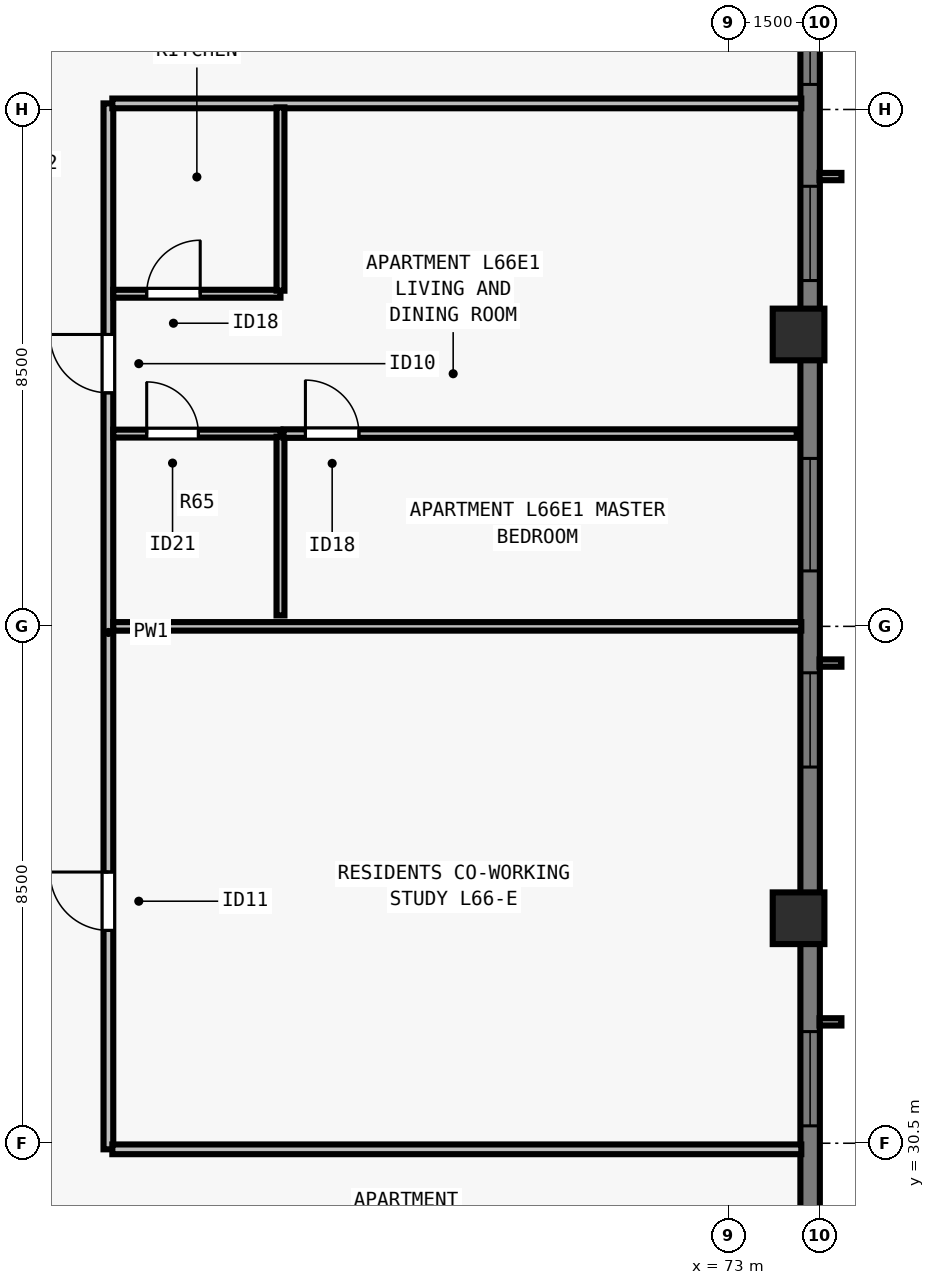
"""IFC4 building model, lengths in metres.
Left out: names, types, materials, properties, quantities, classifications, styles, units other than length and angle.
Written with IfcOpenShell. Run it as: python <this file> out.ifc"""

import sys

from ifc_helpers import new_model, si_unit, direction, frame, frame_2d, origin, origin_2d, place, context, subcontext, project, spatial, rectangle, extrude, element, fill, save


model = new_model("IFC4")
c1 = context("Model", 3, precision=1e-05, world=origin(), true_north=direction((0.0, 1.0)))
c2 = subcontext(c1, "Body", "Model", "MODEL_VIEW")
j1 = project(units=[si_unit("LENGTHUNIT", "METRE"), si_unit("PLANEANGLEUNIT", "RADIAN")], contexts=[c1])
p1 = place(None, origin())
s1 = spatial("IfcSite", under=j1, at=p1, CompositionType="ELEMENT")
p2 = place(p1, origin())
s2 = spatial("IfcBuilding", under=s1, at=p2, CompositionType="ELEMENT")
p3 = place(p2, frame((0.0, 0.0, 241.0)))
s3 = spatial("IfcBuildingStorey", under=s2, at=p3, CompositionType="ELEMENT", Elevation=241.0)
for number, where, z_axis, x_axis in (
    (1, (74.15, 34.2, 0.0), (0.0, 0.0, 1.0), (0.0, 1.0, 0.0)),
    (2, (74.15, 43.8, 0.0), (0.0, 0.0, 1.0), (0.0, 1.0, 0.0)),
):
    element("IfcColumn", number, at=place(p3, frame(where, z_axis=z_axis, x_axis=x_axis)), inside=s3, PredefinedType="COLUMN", context=c2, shape_type="SweptSolid", body=[
        extrude(rectangle(XDim=0.85, YDim=0.85, at=origin_2d()), origin(), (0.0, 0.0, 1.0), 3.5),
    ])
p4 = place(p3, frame((74.34, 56.5, 0.0), z_axis=(0.0, 0.0, 1.0), x_axis=(0.0, -1.0, 0.0)))
e3 = element("IfcWall", 3, at=p4, inside=s3, PredefinedType="SOLIDWALL", context=c2, shape_type="SweptSolid", body=[
    extrude(rectangle(XDim=34.702, YDim=0.32, at=frame_2d((17.351, 0.0))), origin(), (0.0, 0.0, 1.0), 3.29),
])
p5 = place(p4, frame((3.913, 0.0, 0.8)))
e4 = element("IfcOpeningElement", 4, at=p5, cuts=e3, PredefinedType="OPENING", context=c2, shape_type="SweptSolid", body=[
    extrude(rectangle(XDim=1.55, YDim=1.678, at=frame_2d((0.775, 0.839))), frame((0.0, 0.17, 0.0), z_axis=(0.0, -1.0, 0.0), x_axis=(1.0, 0.0, 0.0)), (0.0, 0.0, 1.0), 0.34),
])
p6 = place(p4, frame((6.738, 0.0, 0.8)))
e5 = element("IfcOpeningElement", 5, at=p6, cuts=e3, PredefinedType="OPENING", context=c2, shape_type="SweptSolid", body=[
    extrude(rectangle(XDim=1.85, YDim=1.678, at=frame_2d((0.925, 0.839))), frame((0.0, 0.17, 0.0), z_axis=(0.0, -1.0, 0.0), x_axis=(1.0, 0.0, 0.0)), (0.0, 0.0, 1.0), 0.34),
])
p7 = place(p4, frame((10.263, 0.0, 0.8)))
e6 = element("IfcOpeningElement", 6, at=p7, cuts=e3, PredefinedType="OPENING", context=c2, shape_type="SweptSolid", body=[
    extrude(rectangle(XDim=1.55, YDim=1.678, at=frame_2d((0.775, 0.839))), frame((0.0, 0.17, 0.0), z_axis=(0.0, -1.0, 0.0), x_axis=(1.0, 0.0, 0.0)), (0.0, 0.0, 1.0), 0.34),
])
p8 = place(p4, frame((14.738, 0.0, 0.8)))
e7 = element("IfcOpeningElement", 7, at=p8, cuts=e3, PredefinedType="OPENING", context=c2, shape_type="SweptSolid", body=[
    extrude(rectangle(XDim=1.85, YDim=1.678, at=frame_2d((0.925, 0.839))), frame((0.0, 0.17, 0.0), z_axis=(0.0, -1.0, 0.0), x_axis=(1.0, 0.0, 0.0)), (0.0, 0.0, 1.0), 0.34),
])
p9 = place(p4, frame((18.264, 0.0, 0.8)))
e8 = element("IfcOpeningElement", 8, at=p9, cuts=e3, PredefinedType="OPENING", context=c2, shape_type="SweptSolid", body=[
    extrude(rectangle(XDim=1.55, YDim=1.678, at=frame_2d((0.775, 0.839))), frame((0.0, 0.17, 0.0), z_axis=(0.0, -1.0, 0.0), x_axis=(1.0, 0.0, 0.0)), (0.0, 0.0, 1.0), 0.34),
])
p10 = place(p4, frame((24.164, 0.0, 0.8)))
e9 = element("IfcOpeningElement", 9, at=p10, cuts=e3, PredefinedType="OPENING", context=c2, shape_type="SweptSolid", body=[
    extrude(rectangle(XDim=1.55, YDim=1.678, at=frame_2d((0.775, 0.839))), frame((0.0, 0.17, 0.0), z_axis=(0.0, -1.0, 0.0), x_axis=(1.0, 0.0, 0.0)), (0.0, 0.0, 1.0), 0.34),
])
p11 = place(p3, frame((62.8, 30.4, 0.0), z_axis=(0.0, 0.0, 1.0), x_axis=(0.0, 1.0, 0.0)))
e10 = element("IfcWall", 10, at=p11, inside=s3, PredefinedType="PARTITIONING", context=c2, shape_type="SweptSolid", body=[
    extrude(rectangle(XDim=17.2, YDim=0.16, at=frame_2d((8.6, 0.0))), origin(), (0.0, 0.0, 1.0), 3.29),
])
p12 = place(p11, frame((3.6, 0.0, 0.0)))
e11 = element("IfcOpeningElement", 11, at=p12, cuts=e10, PredefinedType="OPENING", context=c2, shape_type="SweptSolid", body=[
    extrude(rectangle(XDim=0.96, YDim=2.12, at=frame_2d((0.48, 1.06))), frame((0.0, 0.09, 0.0), z_axis=(0.0, -1.0, 0.0), x_axis=(1.0, 0.0, 0.0)), (0.0, 0.0, 1.0), 0.18),
])
p13 = place(p11, frame((12.44, 0.0, 0.0)))
e12 = element("IfcOpeningElement", 12, at=p13, cuts=e10, PredefinedType="OPENING", context=c2, shape_type="SweptSolid", body=[
    extrude(rectangle(XDim=0.96, YDim=2.18, at=frame_2d((0.48, 1.09))), frame((0.0, 0.09, 0.0), z_axis=(0.0, -1.0, 0.0), x_axis=(1.0, 0.0, 0.0)), (0.0, 0.0, 1.0), 0.18),
])
for number, where, z_axis, x_axis in (
    (13, (62.865, 30.4, 0.0), (0.0, 0.0, 1.0), (1.0, 0.0, 0.0)),
    (14, (62.865, 47.6, 0.0), (0.0, 0.0, 1.0), (1.0, 0.0, 0.0)),
):
    element("IfcWall", number, at=place(p3, frame(where, z_axis=z_axis, x_axis=x_axis)), inside=s3, PredefinedType="PARTITIONING", context=c2, shape_type="SweptSolid", body=[
        extrude(rectangle(XDim=11.33, YDim=0.16, at=frame_2d((5.665, 0.0))), origin(), (0.0, 0.0, 1.0), 3.29),
    ])
p14 = place(p3, frame((62.88, 39.0, 0.0), z_axis=(0.0, 0.0, 1.0), x_axis=(1.0, 0.0, 0.0)))
e15 = element("IfcWall", 15, at=p14, inside=s3, PredefinedType="PARTITIONING", context=c2, shape_type="SweptSolid", body=[
    extrude(rectangle(XDim=11.315, YDim=0.14, at=frame_2d((5.658, 0.0))), origin(), (0.0, 0.0, 1.0), 3.29),
])
p15 = place(p3, frame((62.88, 42.17, 0.0), z_axis=(0.0, 0.0, 1.0), x_axis=(1.0, 0.0, 0.0)))
e16 = element("IfcWall", 16, at=p15, inside=s3, PredefinedType="PLUMBINGWALL", context=c2, shape_type="SweptSolid", body=[
    extrude(rectangle(XDim=2.75, YDim=0.13, at=frame_2d((1.375, 0.0))), origin(), (0.0, 0.0, 1.0), 3.29),
])
p16 = place(p15, frame((0.55, 0.0, 0.0)))
e17 = element("IfcOpeningElement", 17, at=p16, cuts=e16, PredefinedType="OPENING", context=c2, shape_type="SweptSolid", body=[
    extrude(rectangle(XDim=0.85, YDim=2.08, at=frame_2d((0.425, 1.04))), frame((0.0, 0.075, 0.0), z_axis=(0.0, -1.0, 0.0), x_axis=(1.0, 0.0, 0.0)), (0.0, 0.0, 1.0), 0.15),
])
p17 = place(p3, frame((65.63, 39.18, 0.0), z_axis=(0.0, 0.0, 1.0), x_axis=(0.0, 1.0, 0.0)))
e18 = element("IfcWall", 18, at=p17, inside=s3, PredefinedType="PLUMBINGWALL", context=c2, shape_type="SweptSolid", body=[
    extrude(rectangle(XDim=2.94, YDim=0.13, at=frame_2d((1.47, 0.0))), origin(), (0.0, 0.0, 1.0), 3.29),
])
p18 = place(p3, frame((62.88, 44.47, 0.0), z_axis=(0.0, 0.0, 1.0), x_axis=(1.0, 0.0, 0.0)))
e19 = element("IfcWall", 19, at=p18, inside=s3, PredefinedType="PLUMBINGWALL", context=c2, shape_type="SweptSolid", body=[
    extrude(rectangle(XDim=2.75, YDim=0.13, at=frame_2d((1.375, 0.0))), origin(), (0.0, 0.0, 1.0), 3.29),
])
p19 = place(p18, frame((0.55, 0.0, 0.0)))
e20 = element("IfcOpeningElement", 20, at=p19, cuts=e19, PredefinedType="OPENING", context=c2, shape_type="SweptSolid", body=[
    extrude(rectangle(XDim=0.88, YDim=2.1, at=frame_2d((0.44, 1.05))), frame((0.0, 0.075, 0.0), z_axis=(0.0, -1.0, 0.0), x_axis=(1.0, 0.0, 0.0)), (0.0, 0.0, 1.0), 0.15),
])
p20 = place(p3, frame((65.63, 44.52, 0.0), z_axis=(0.0, 0.0, 1.0), x_axis=(0.0, 1.0, 0.0)))
e21 = element("IfcWall", 21, at=p20, inside=s3, PredefinedType="PLUMBINGWALL", context=c2, shape_type="SweptSolid", body=[
    extrude(rectangle(XDim=3.015, YDim=0.13, at=frame_2d((1.507, 0.0))), origin(), (0.0, 0.0, 1.0), 3.29),
])
p21 = place(p3, frame((65.68, 42.17, 0.0), z_axis=(0.0, 0.0, 1.0), x_axis=(1.0, 0.0, 0.0)))
e22 = element("IfcWall", 22, at=p21, inside=s3, PredefinedType="PARTITIONING", context=c2, shape_type="SweptSolid", body=[
    extrude(rectangle(XDim=8.44, YDim=0.14, at=frame_2d((4.22, 0.0))), origin(), (0.0, 0.0, 1.0), 3.29),
])
p22 = place(p21, frame((0.36, 0.0, 0.0)))
e23 = element("IfcOpeningElement", 23, at=p22, cuts=e22, PredefinedType="OPENING", context=c2, shape_type="SweptSolid", body=[
    extrude(rectangle(XDim=0.88, YDim=2.1, at=frame_2d((0.44, 1.05))), frame((0.0, 0.08, 0.0), z_axis=(0.0, -1.0, 0.0), x_axis=(1.0, 0.0, 0.0)), (0.0, 0.0, 1.0), 0.16),
])
p23 = place(p6, origin())
e24 = element("IfcWindow", 24, at=p23, inside=s3, PartitioningType="SINGLE_PANEL", PredefinedType="WINDOW", context=c2, shape_type="SweptSolid", body=[
    extrude(rectangle(XDim=1.85, YDim=1.678, at=frame_2d((0.925, 0.839))), frame((0.0, -0.05, 0.0), z_axis=(0.0, -1.0, 0.0), x_axis=(1.0, 0.0, 0.0)), (0.0, 0.0, 1.0), 0.06),
])
fill(e5, e24)
p24 = place(p7, origin())
e25 = element("IfcWindow", 25, at=p24, inside=s3, PartitioningType="SINGLE_PANEL", PredefinedType="WINDOW", context=c2, shape_type="SweptSolid", body=[
    extrude(rectangle(XDim=1.55, YDim=1.678, at=frame_2d((0.775, 0.839))), frame((0.0, -0.05, 0.0), z_axis=(0.0, -1.0, 0.0), x_axis=(1.0, 0.0, 0.0)), (0.0, 0.0, 1.0), 0.06),
])
fill(e6, e25)
p25 = place(p8, origin())
e26 = element("IfcWindow", 26, at=p25, inside=s3, PartitioningType="SINGLE_PANEL", PredefinedType="WINDOW", context=c2, shape_type="SweptSolid", body=[
    extrude(rectangle(XDim=1.85, YDim=1.678, at=frame_2d((0.925, 0.839))), frame((0.0, -0.05, 0.0), z_axis=(0.0, -1.0, 0.0), x_axis=(1.0, 0.0, 0.0)), (0.0, 0.0, 1.0), 0.06),
])
fill(e7, e26)
p26 = place(p9, origin())
e27 = element("IfcWindow", 27, at=p26, inside=s3, PartitioningType="SINGLE_PANEL", PredefinedType="WINDOW", context=c2, shape_type="SweptSolid", body=[
    extrude(rectangle(XDim=1.55, YDim=1.678, at=frame_2d((0.775, 0.839))), frame((0.0, -0.05, 0.0), z_axis=(0.0, -1.0, 0.0), x_axis=(1.0, 0.0, 0.0)), (0.0, 0.0, 1.0), 0.06),
])
fill(e8, e27)
p27 = place(p10, origin())
e28 = element("IfcWindow", 28, at=p27, inside=s3, PartitioningType="SINGLE_PANEL", PredefinedType="WINDOW", context=c2, shape_type="SweptSolid", body=[
    extrude(rectangle(XDim=1.55, YDim=1.678, at=frame_2d((0.775, 0.839))), frame((0.0, -0.05, 0.0), z_axis=(0.0, -1.0, 0.0), x_axis=(1.0, 0.0, 0.0)), (0.0, 0.0, 1.0), 0.06),
])
fill(e9, e28)
p28 = place(p12, origin())
e29 = element("IfcDoor", 29, at=p28, inside=s3, OperationType="SINGLE_SWING_RIGHT", PredefinedType="DOOR", context=c2, shape_type="SweptSolid", body=[
    extrude(rectangle(XDim=0.96, YDim=2.12, at=frame_2d((0.48, 1.06))), frame((0.0, 0.025, 0.0), z_axis=(0.0, -1.0, 0.0), x_axis=(1.0, 0.0, 0.0)), (0.0, 0.0, 1.0), 0.05),
])
fill(e11, e29)
p29 = place(p16, origin())
e30 = element("IfcDoor", 30, at=p29, inside=s3, OperationType="SINGLE_SWING_LEFT", PredefinedType="DOOR", context=c2, shape_type="SweptSolid", body=[
    extrude(rectangle(XDim=0.85, YDim=2.08, at=frame_2d((0.425, 1.04))), frame((0.0, 0.025, 0.0), z_axis=(0.0, -1.0, 0.0), x_axis=(1.0, 0.0, 0.0)), (0.0, 0.0, 1.0), 0.05),
])
fill(e17, e30)
p30 = place(p19, origin())
e31 = element("IfcDoor", 31, at=p30, inside=s3, OperationType="SINGLE_SWING_RIGHT", PredefinedType="DOOR", context=c2, shape_type="SweptSolid", body=[
    extrude(rectangle(XDim=0.88, YDim=2.1, at=frame_2d((0.44, 1.05))), frame((0.0, 0.025, 0.0), z_axis=(0.0, -1.0, 0.0), x_axis=(1.0, 0.0, 0.0)), (0.0, 0.0, 1.0), 0.05),
])
fill(e20, e31)
p31 = place(p22, origin())
e32 = element("IfcDoor", 32, at=p31, inside=s3, OperationType="SINGLE_SWING_LEFT", PredefinedType="DOOR", context=c2, shape_type="SweptSolid", body=[
    extrude(rectangle(XDim=0.88, YDim=2.1, at=frame_2d((0.44, 1.05))), frame((0.0, 0.025, 0.0), z_axis=(0.0, -1.0, 0.0), x_axis=(1.0, 0.0, 0.0)), (0.0, 0.0, 1.0), 0.05),
])
fill(e23, e32)
p32 = place(p13, origin())
e33 = element("IfcDoor", 33, at=p32, inside=s3, OperationType="SINGLE_SWING_RIGHT", PredefinedType="DOOR", context=c2, shape_type="SweptSolid", body=[
    extrude(rectangle(XDim=0.96, YDim=2.18, at=frame_2d((0.48, 1.09))), frame((0.0, 0.025, 0.0), z_axis=(0.0, -1.0, 0.0), x_axis=(1.0, 0.0, 0.0)), (0.0, 0.0, 1.0), 0.05),
])
fill(e12, e33)
save(model, sys.argv[1])
